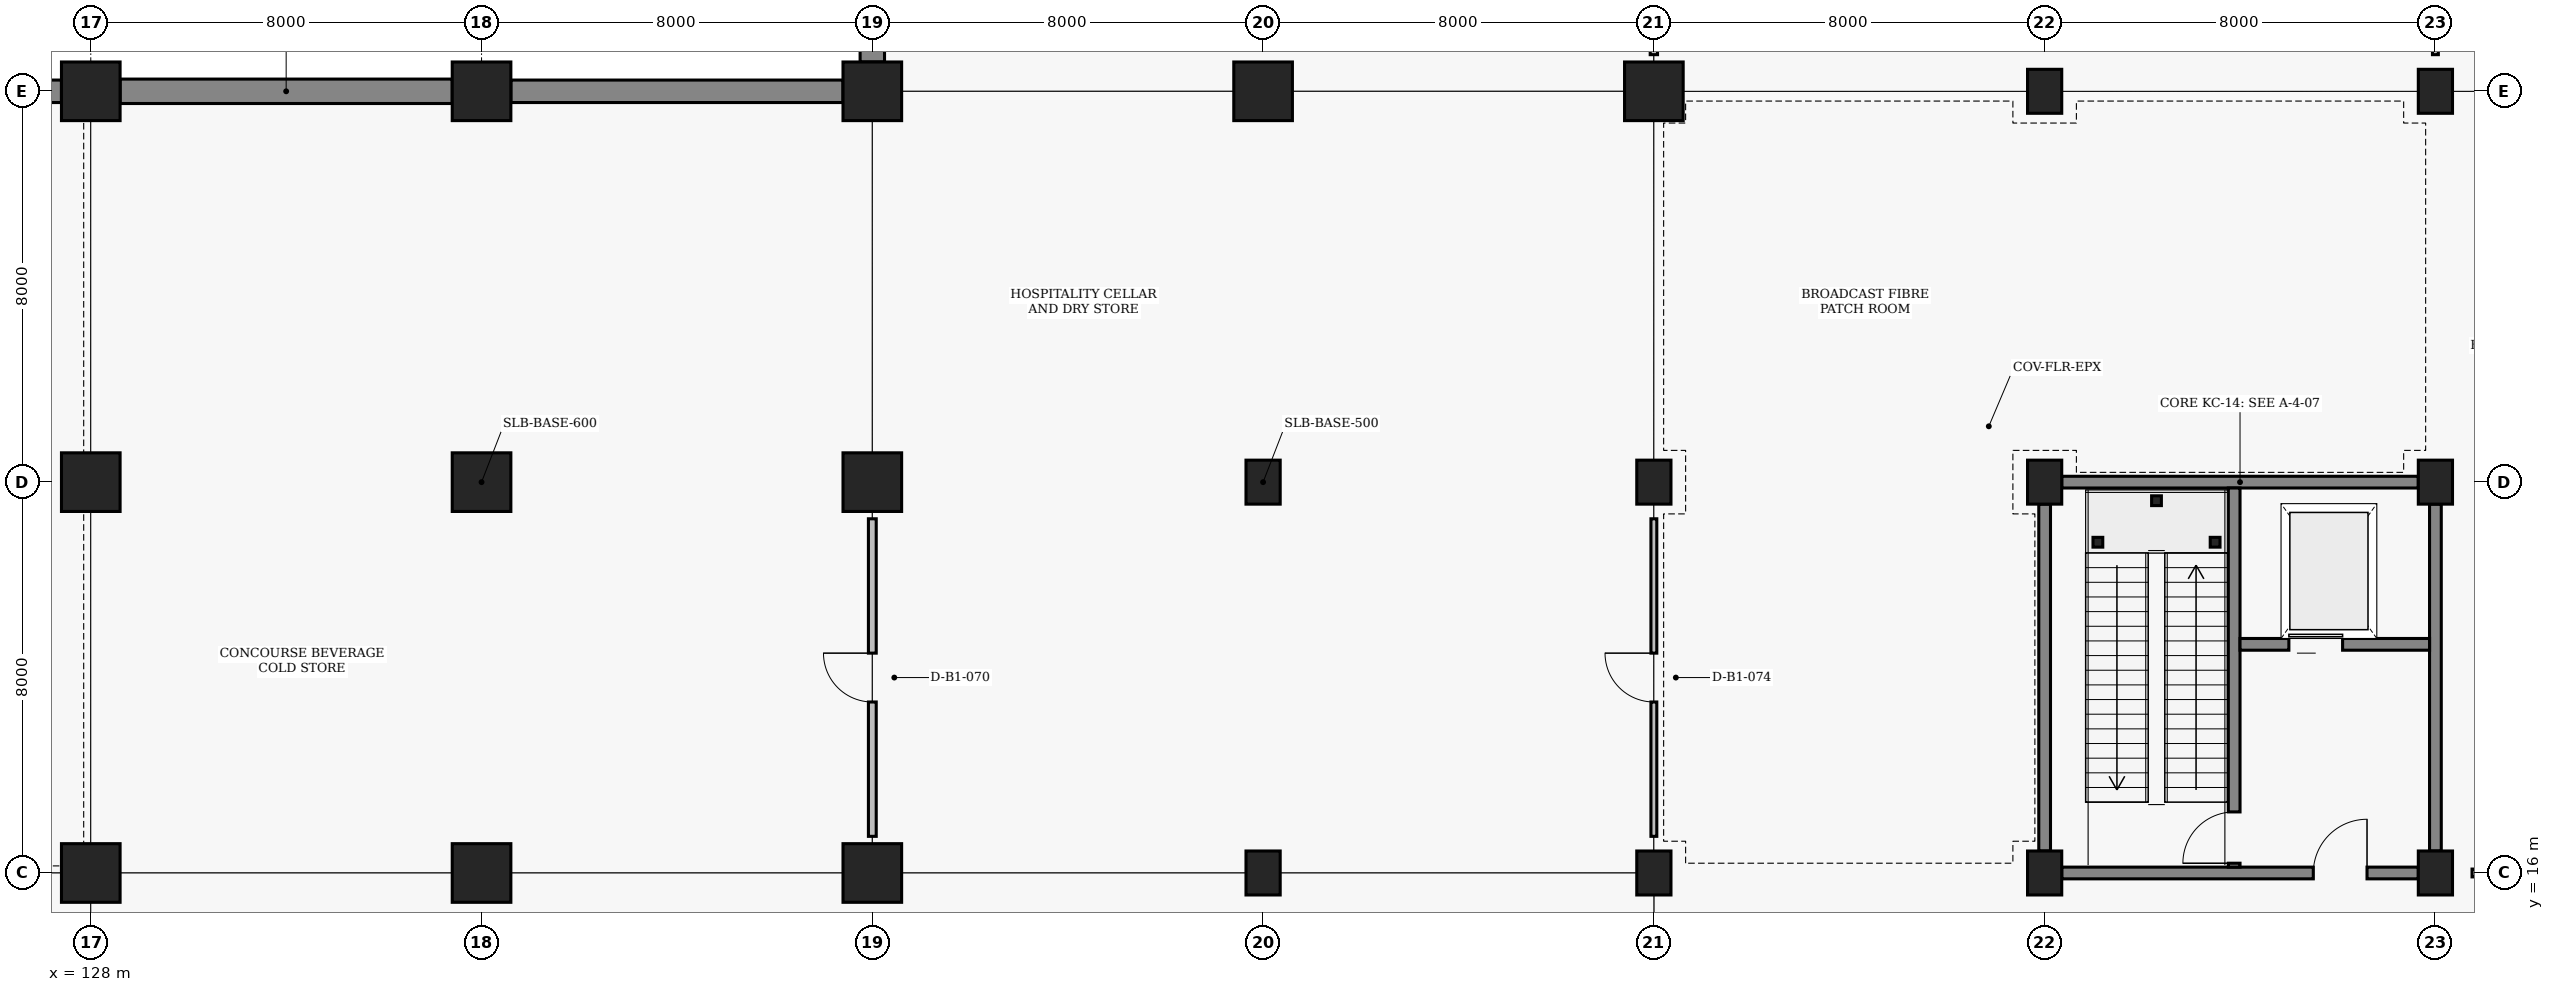
"""IFC4 building model, lengths in metres.
Left out: names, types, materials, properties, quantities, classifications, styles, units other than length and angle.
Written with IfcOpenShell. Run it as: python <this file> out.ifc"""

import sys

from ifc_helpers import new_model, si_unit, direction, frame, frame_2d, origin, origin_2d, place, context, subcontext, project, spatial, rectangle, hollow_rectangle, extrude, element, fill, save


model = new_model("IFC4")
c1 = context("Model", 3, precision=1e-05, world=origin(), true_north=direction((0.0, 1.0)))
c2 = subcontext(c1, "Body", "Model", "MODEL_VIEW")
j1 = project(units=[si_unit("LENGTHUNIT", "METRE"), si_unit("PLANEANGLEUNIT", "RADIAN")], contexts=[c1])
p1 = place(None, origin())
s1 = spatial("IfcSite", under=j1, at=p1, CompositionType="ELEMENT")
p2 = place(p1, origin())
s2 = spatial("IfcBuilding", under=s1, at=p2, CompositionType="ELEMENT")
p3 = place(p2, frame((0.0, 0.0, -5.4)))
s3 = spatial("IfcBuildingStorey", under=s2, at=p3, CompositionType="ELEMENT", Elevation=-5.4)
for number, where, z_axis, x_axis in (
    (1, (128.0, 16.0, 0.0), (0.0, 0.0, 1.0), (1.0, 0.0, 0.0)),
    (2, (128.0, 24.0, 0.0), (0.0, 0.0, 1.0), (1.0, 0.0, 0.0)),
    (3, (128.0, 32.0, 0.0), (0.0, 0.0, 1.0), (1.0, 0.0, 0.0)),
    (4, (136.0, 16.0, 0.0), (0.0, 0.0, 1.0), (1.0, 0.0, 0.0)),
    (5, (136.0, 24.0, 0.0), (0.0, 0.0, 1.0), (1.0, 0.0, 0.0)),
    (6, (136.0, 32.0, 0.0), (0.0, 0.0, 1.0), (1.0, 0.0, 0.0)),
    (7, (144.0, 16.0, 0.0), (0.0, 0.0, 1.0), (1.0, 0.0, 0.0)),
    (8, (144.0, 24.0, 0.0), (0.0, 0.0, 1.0), (1.0, 0.0, 0.0)),
    (9, (144.0, 32.0, 0.0), (0.0, 0.0, 1.0), (1.0, 0.0, 0.0)),
):
    element("IfcColumn", number, at=place(p3, frame(where, z_axis=z_axis, x_axis=x_axis)), inside=s3, PredefinedType="COLUMN", context=c2, shape_type="SweptSolid", body=[
        extrude(rectangle(XDim=1.2, YDim=1.2, at=origin_2d()), origin(), (0.0, 0.0, 1.0), 5.4),
    ])
for number, where, z_axis, x_axis in (
    (10, (152.0, 16.0, 0.0), (0.0, 0.0, 1.0), (1.0, 0.0, 0.0)),
    (11, (152.0, 24.0, 0.0), (0.0, 0.0, 1.0), (1.0, 0.0, 0.0)),
):
    element("IfcColumn", number, at=place(p3, frame(where, z_axis=z_axis, x_axis=x_axis)), inside=s3, PredefinedType="COLUMN", context=c2, shape_type="SweptSolid", body=[
        extrude(rectangle(XDim=0.7, YDim=0.9, at=origin_2d()), origin(), (0.0, 0.0, 1.0), 5.4),
    ])
p4 = place(p3, frame((152.0, 32.0, 0.0), z_axis=(0.0, 0.0, 1.0), x_axis=(1.0, 0.0, 0.0)))
e12 = element("IfcColumn", 12, at=p4, inside=s3, PredefinedType="COLUMN", context=c2, shape_type="SweptSolid", body=[
    extrude(rectangle(XDim=1.2, YDim=1.2, at=origin_2d()), origin(), (0.0, 0.0, 1.0), 5.4),
])
for number, where, z_axis, x_axis in (
    (13, (160.0, 16.0, 0.0), (0.0, 0.0, 1.0), (1.0, 0.0, 0.0)),
    (14, (160.0, 24.0, 0.0), (0.0, 0.0, 1.0), (1.0, 0.0, 0.0)),
):
    element("IfcColumn", number, at=place(p3, frame(where, z_axis=z_axis, x_axis=x_axis)), inside=s3, PredefinedType="COLUMN", context=c2, shape_type="SweptSolid", body=[
        extrude(rectangle(XDim=0.7, YDim=0.9, at=origin_2d()), origin(), (0.0, 0.0, 1.0), 5.4),
    ])
p5 = place(p3, frame((160.0, 32.0, 0.0), z_axis=(0.0, 0.0, 1.0), x_axis=(1.0, 0.0, 0.0)))
e15 = element("IfcColumn", 15, at=p5, inside=s3, PredefinedType="COLUMN", context=c2, shape_type="SweptSolid", body=[
    extrude(rectangle(XDim=1.2, YDim=1.2, at=origin_2d()), origin(), (0.0, 0.0, 1.0), 5.4),
])
for number, where, z_axis, x_axis in (
    (16, (168.0, 16.0, 0.0), (0.0, 0.0, 1.0), (1.0, 0.0, 0.0)),
    (17, (168.0, 24.0, 0.0), (0.0, 0.0, 1.0), (1.0, 0.0, 0.0)),
    (18, (168.0, 32.0, 0.0), (0.0, 0.0, 1.0), (1.0, 0.0, 0.0)),
    (19, (176.0, 16.0, 0.0), (0.0, 0.0, 1.0), (1.0, 0.0, 0.0)),
    (20, (176.0, 24.0, 0.0), (0.0, 0.0, 1.0), (1.0, 0.0, 0.0)),
    (21, (176.0, 32.0, 0.0), (0.0, 0.0, 1.0), (1.0, 0.0, 0.0)),
):
    element("IfcColumn", number, at=place(p3, frame(where, z_axis=z_axis, x_axis=x_axis)), inside=s3, PredefinedType="COLUMN", context=c2, shape_type="SweptSolid", body=[
        extrude(rectangle(XDim=0.7, YDim=0.9, at=origin_2d()), origin(), (0.0, 0.0, 1.0), 5.4),
    ])
p6 = place(p3, frame((120.6, 32.0, 0.0), z_axis=(0.0, 0.0, 1.0), x_axis=(1.0, 0.0, 0.0)))
e22 = element("IfcWall", 22, at=p6, inside=s3, PredefinedType="STANDARD", context=c2, shape_type="SweptSolid", body=[
    extrude(rectangle(XDim=6.8, YDim=0.46, at=frame_2d((3.4, 0.0))), origin(), (0.0, 0.0, 1.0), 4.34),
])
p7 = place(p3, frame((128.6, 32.0, 0.0), z_axis=(0.0, 0.0, 1.0), x_axis=(1.0, 0.0, 0.0)))
e23 = element("IfcWall", 23, at=p7, inside=s3, PredefinedType="STANDARD", context=c2, shape_type="SweptSolid", body=[
    extrude(rectangle(XDim=6.8, YDim=0.5, at=frame_2d((3.4, 0.0))), origin(), (0.0, 0.0, 1.0), 4.34),
])
p8 = place(p3, frame((136.6, 32.0, 0.0), z_axis=(0.0, 0.0, 1.0), x_axis=(1.0, 0.0, 0.0)))
e24 = element("IfcWall", 24, at=p8, inside=s3, PredefinedType="STANDARD", context=c2, shape_type="SweptSolid", body=[
    extrude(rectangle(XDim=6.8, YDim=0.46, at=frame_2d((3.4, 0.0))), origin(), (0.0, 0.0, 1.0), 4.24),
])
p9 = place(p3, frame((144.0, 32.6, 0.0), z_axis=(0.0, 0.0, 1.0), x_axis=(0.0, 1.0, 0.0)))
e25 = element("IfcWall", 25, at=p9, inside=s3, PredefinedType="STANDARD", context=c2, shape_type="SweptSolid", body=[
    extrude(rectangle(XDim=6.8, YDim=0.5, at=frame_2d((3.4, 0.0))), origin(), (0.0, 0.0, 1.0), 4.24),
])
p10 = place(p3, frame((168.35, 16.0, 0.0), z_axis=(0.0, 0.0, 1.0), x_axis=(1.0, 0.0, 0.0)))
e26 = element("IfcWall", 26, at=p10, inside=s3, PredefinedType="SHEAR", context=c2, shape_type="SweptSolid", body=[
    extrude(rectangle(XDim=7.3, YDim=0.24, at=frame_2d((3.65, 0.0))), origin(), (0.0, 0.0, 1.0), 4.39),
])
p11 = place(p10, frame((5.15, 0.0, 0.0)))
e27 = element("IfcOpeningElement", 27, at=p11, cuts=e26, PredefinedType="OPENING", context=c2, shape_type="SweptSolid", body=[
    extrude(rectangle(XDim=1.1, YDim=2.2, at=frame_2d((0.55, 1.1))), frame((0.0, 0.13, 0.0), z_axis=(0.0, -1.0, 0.0), x_axis=(1.0, 0.0, 0.0)), (0.0, 0.0, 1.0), 0.26),
])
p12 = place(p3, frame((168.35, 24.0, 0.0), z_axis=(0.0, 0.0, 1.0), x_axis=(1.0, 0.0, 0.0)))
e28 = element("IfcWall", 28, at=p12, inside=s3, PredefinedType="SHEAR", context=c2, shape_type="SweptSolid", body=[
    extrude(rectangle(XDim=7.3, YDim=0.24, at=frame_2d((3.65, 0.0))), origin(), (0.0, 0.0, 1.0), 4.39),
])
for number, where, z_axis, x_axis in (
    (29, (168.0, 16.45, 0.0), (0.0, 0.0, 1.0), (0.0, 1.0, 0.0)),
    (30, (176.0, 16.45, 0.0), (0.0, 0.0, 1.0), (0.0, 1.0, 0.0)),
):
    element("IfcWall", number, at=place(p3, frame(where, z_axis=z_axis, x_axis=x_axis)), inside=s3, PredefinedType="SHEAR", context=c2, shape_type="SweptSolid", body=[
        extrude(rectangle(XDim=7.1, YDim=0.24, at=frame_2d((3.55, 0.0))), origin(), (0.0, 0.0, 1.0), 4.39),
    ])
p13 = place(p3, frame((171.88, 16.12, 0.0), z_axis=(0.0, 0.0, 1.0), x_axis=(0.0, 1.0, 0.0)))
e31 = element("IfcWall", 31, at=p13, inside=s3, PredefinedType="SHEAR", context=c2, shape_type="SweptSolid", body=[
    extrude(rectangle(XDim=7.76, YDim=0.24, at=frame_2d((3.88, 0.0))), origin(), (0.0, 0.0, 1.0), 4.59),
])
p14 = place(p13, frame((0.08, 0.0, 0.0)))
e32 = element("IfcOpeningElement", 32, at=p14, cuts=e31, PredefinedType="OPENING", context=c2, shape_type="SweptSolid", body=[
    extrude(rectangle(XDim=1.05, YDim=2.15, at=frame_2d((0.525, 1.075))), frame((0.0, 0.13, 0.0), z_axis=(0.0, -1.0, 0.0), x_axis=(1.0, 0.0, 0.0)), (0.0, 0.0, 1.0), 0.26),
])
p15 = place(p3, frame((172.0, 20.68, 0.0), z_axis=(0.0, 0.0, 1.0), x_axis=(1.0, 0.0, 0.0)))
e33 = element("IfcWall", 33, at=p15, inside=s3, PredefinedType="SHEAR", context=c2, shape_type="SweptSolid", body=[
    extrude(rectangle(XDim=3.88, YDim=0.24, at=frame_2d((1.94, 0.0))), origin(), (0.0, 0.0, 1.0), 4.39),
])
p16 = place(p15, frame((1.0, 0.0, 0.0)))
e34 = element("IfcOpeningElement", 34, at=p16, cuts=e33, PredefinedType="OPENING", context=c2, shape_type="SweptSolid", body=[
    extrude(rectangle(XDim=1.1, YDim=2.15, at=frame_2d((0.55, 1.075))), frame((0.0, 0.13, 0.0), z_axis=(0.0, -1.0, 0.0), x_axis=(1.0, 0.0, 0.0)), (0.0, 0.0, 1.0), 0.26),
])
for number, where, z_axis, x_axis in (
    (35, (169.09, 22.77, 0.0), (0.0, 0.0, 1.0), (1.0, 0.0, 0.0)),
    (36, (171.49, 22.77, 0.0), (0.0, 0.0, 1.0), (1.0, 0.0, 0.0)),
    (37, (170.29, 23.62, 0.0), (0.0, 0.0, 1.0), (1.0, 0.0, 0.0)),
):
    element("IfcColumn", number, at=place(p3, frame(where, z_axis=z_axis, x_axis=x_axis)), inside=s3, PredefinedType="COLUMN", context=c2, shape_type="SweptSolid", body=[
        extrude(hollow_rectangle(XDim=0.2, YDim=0.2, WallThickness=0.009, at=origin_2d()), origin(), (0.0, 0.0, 1.0), 2.5),
    ])
p17 = place(p3, frame((144.0, 16.75, 0.0), z_axis=(0.0, 0.0, 1.0), x_axis=(0.0, 1.0, 0.0)))
e38 = element("IfcWall", 38, at=p17, inside=s3, PredefinedType="PARTITIONING", context=c2, shape_type="SweptSolid", body=[
    extrude(rectangle(XDim=6.5, YDim=0.16, at=frame_2d((3.25, 0.0))), origin(), (0.0, 0.0, 1.0), 3.69),
])
p18 = place(p17, frame((2.75, 0.0, 0.0)))
e39 = element("IfcOpeningElement", 39, at=p18, cuts=e38, PredefinedType="OPENING", context=c2, shape_type="SweptSolid", body=[
    extrude(rectangle(XDim=1.0, YDim=2.1, at=frame_2d((0.5, 1.05))), frame((0.0, 0.09, 0.0), z_axis=(0.0, -1.0, 0.0), x_axis=(1.0, 0.0, 0.0)), (0.0, 0.0, 1.0), 0.18),
])
p19 = place(p3, frame((160.0, 16.75, 0.0), z_axis=(0.0, 0.0, 1.0), x_axis=(0.0, 1.0, 0.0)))
e40 = element("IfcWall", 40, at=p19, inside=s3, PredefinedType="PARTITIONING", context=c2, shape_type="SweptSolid", body=[
    extrude(rectangle(XDim=6.5, YDim=0.12, at=frame_2d((3.25, 0.0))), origin(), (0.0, 0.0, 1.0), 3.64),
])
p20 = place(p19, frame((2.75, 0.0, 0.0)))
e41 = element("IfcOpeningElement", 41, at=p20, cuts=e40, PredefinedType="OPENING", context=c2, shape_type="SweptSolid", body=[
    extrude(rectangle(XDim=1.0, YDim=2.1, at=frame_2d((0.5, 1.05))), frame((0.0, 0.07, 0.0), z_axis=(0.0, -1.0, 0.0), x_axis=(1.0, 0.0, 0.0)), (0.0, 0.0, 1.0), 0.14),
])
p21 = place(p3, frame((160.0, 32.75, 0.0), z_axis=(0.0, 0.0, 1.0), x_axis=(0.0, 1.0, 0.0)))
e42 = element("IfcWall", 42, at=p21, inside=s3, PredefinedType="PARTITIONING", context=c2, shape_type="SweptSolid", body=[
    extrude(rectangle(XDim=6.5, YDim=0.15, at=frame_2d((3.25, 0.0))), origin(), (0.0, 0.0, 1.0), 4.39),
])
p22 = place(p21, frame((2.725, 0.0, 0.0)))
e43 = element("IfcOpeningElement", 43, at=p22, cuts=e42, PredefinedType="OPENING", context=c2, shape_type="SweptSolid", body=[
    extrude(rectangle(XDim=1.05, YDim=2.15, at=frame_2d((0.525, 1.075))), frame((0.0, 0.085, 0.0), z_axis=(0.0, -1.0, 0.0), x_axis=(1.0, 0.0, 0.0)), (0.0, 0.0, 1.0), 0.17),
])
p23 = place(p3, frame((176.75, 16.0, 0.0), z_axis=(0.0, 0.0, 1.0), x_axis=(1.0, 0.0, 0.0)))
e44 = element("IfcWall", 44, at=p23, inside=s3, PredefinedType="PARTITIONING", context=c2, shape_type="SweptSolid", body=[
    extrude(rectangle(XDim=6.5, YDim=0.16, at=frame_2d((3.25, 0.0))), origin(), (0.0, 0.0, 1.0), 4.49),
])
p24 = place(p23, frame((2.775, 0.0, 0.0)))
e45 = element("IfcOpeningElement", 45, at=p24, cuts=e44, PredefinedType="OPENING", context=c2, shape_type="SweptSolid", body=[
    extrude(rectangle(XDim=0.95, YDim=2.1, at=frame_2d((0.475, 1.05))), frame((0.0, 0.09, 0.0), z_axis=(0.0, -1.0, 0.0), x_axis=(1.0, 0.0, 0.0)), (0.0, 0.0, 1.0), 0.18),
])
p25 = place(p3, frame((176.0, 32.75, 0.0), z_axis=(0.0, 0.0, 1.0), x_axis=(0.0, 1.0, 0.0)))
e46 = element("IfcWall", 46, at=p25, inside=s3, PredefinedType="PARTITIONING", context=c2, shape_type="SweptSolid", body=[
    extrude(rectangle(XDim=6.5, YDim=0.12, at=frame_2d((3.25, 0.0))), origin(), (0.0, 0.0, 1.0), 4.39),
])
p26 = place(p25, frame((2.75, 0.0, 0.0)))
e47 = element("IfcOpeningElement", 47, at=p26, cuts=e46, PredefinedType="OPENING", context=c2, shape_type="SweptSolid", body=[
    extrude(rectangle(XDim=1.0, YDim=2.1, at=frame_2d((0.5, 1.05))), frame((0.0, 0.07, 0.0), z_axis=(0.0, -1.0, 0.0), x_axis=(1.0, 0.0, 0.0)), (0.0, 0.0, 1.0), 0.14),
])
p27 = place(p11, origin())
e48 = element("IfcDoor", 48, at=p27, inside=s3, OperationType="SINGLE_SWING_RIGHT", PredefinedType="DOOR", context=c2, shape_type="SweptSolid", body=[
    extrude(rectangle(XDim=1.1, YDim=2.2, at=frame_2d((0.55, 1.1))), frame((0.0, 0.025, 0.0), z_axis=(0.0, -1.0, 0.0), x_axis=(1.0, 0.0, 0.0)), (0.0, 0.0, 1.0), 0.05),
])
fill(e27, e48)
p28 = place(p14, origin())
e49 = element("IfcDoor", 49, at=p28, inside=s3, OperationType="SINGLE_SWING_LEFT", PredefinedType="DOOR", context=c2, shape_type="SweptSolid", body=[
    extrude(rectangle(XDim=1.05, YDim=2.15, at=frame_2d((0.525, 1.075))), frame((0.0, 0.025, 0.0), z_axis=(0.0, -1.0, 0.0), x_axis=(1.0, 0.0, 0.0)), (0.0, 0.0, 1.0), 0.05),
])
fill(e32, e49)
p29 = place(p16, origin())
e50 = element("IfcDoor", 50, at=p29, inside=s3, OperationType="SLIDING_TO_LEFT", PredefinedType="DOOR", context=c2, shape_type="SweptSolid", body=[
    extrude(rectangle(XDim=1.1, YDim=2.15, at=frame_2d((0.55, 1.075))), frame((0.0, 0.025, 0.0), z_axis=(0.0, -1.0, 0.0), x_axis=(1.0, 0.0, 0.0)), (0.0, 0.0, 1.0), 0.05),
])
fill(e34, e50)
p30 = place(p18, origin())
e51 = element("IfcDoor", 51, at=p30, inside=s3, OperationType="SINGLE_SWING_RIGHT", PredefinedType="DOOR", context=c2, shape_type="SweptSolid", body=[
    extrude(rectangle(XDim=1.0, YDim=2.1, at=frame_2d((0.5, 1.05))), frame((0.0, 0.025, 0.0), z_axis=(0.0, -1.0, 0.0), x_axis=(1.0, 0.0, 0.0)), (0.0, 0.0, 1.0), 0.05),
])
fill(e39, e51)
p31 = place(p20, origin())
e52 = element("IfcDoor", 52, at=p31, inside=s3, OperationType="SINGLE_SWING_RIGHT", PredefinedType="DOOR", context=c2, shape_type="SweptSolid", body=[
    extrude(rectangle(XDim=1.0, YDim=2.1, at=frame_2d((0.5, 1.05))), frame((0.0, 0.025, 0.0), z_axis=(0.0, -1.0, 0.0), x_axis=(1.0, 0.0, 0.0)), (0.0, 0.0, 1.0), 0.05),
])
fill(e41, e52)
save(model, sys.argv[1])
